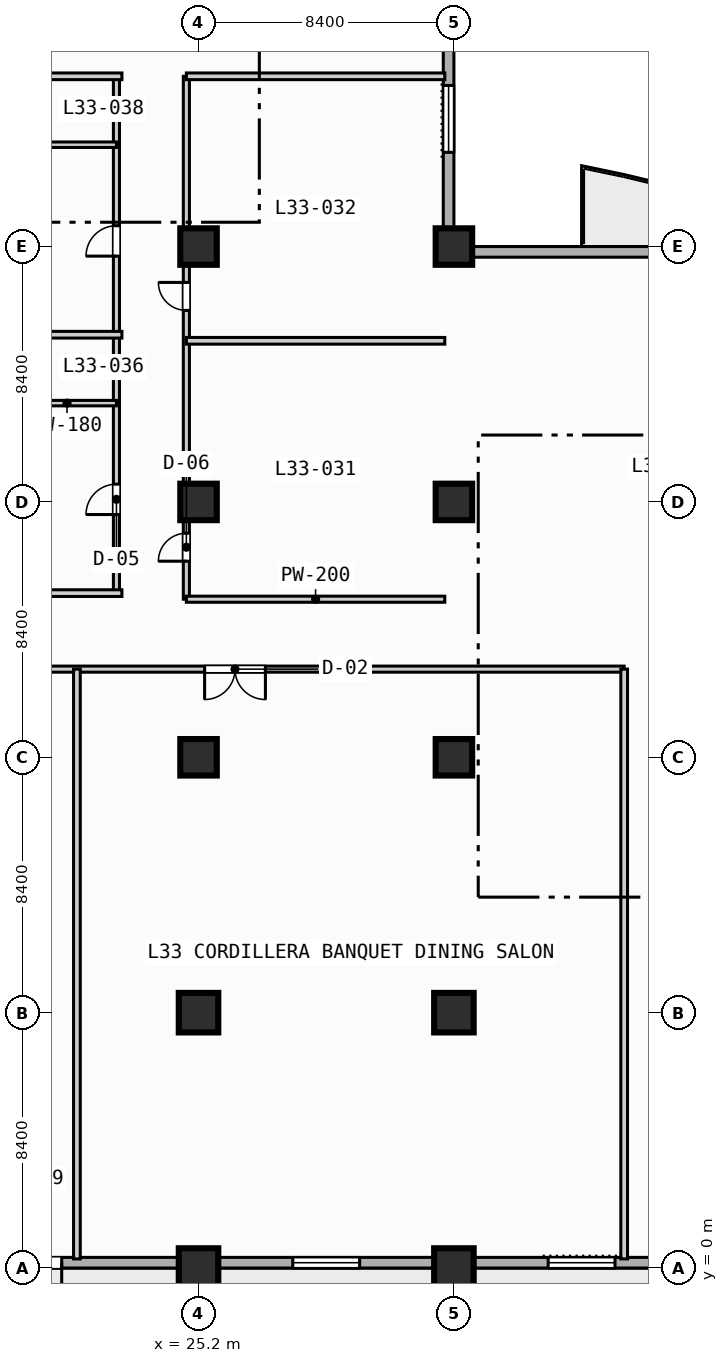
"""IFC4 building model, lengths in metres.
Left out: names, types, materials, properties, quantities, classifications, styles, units other than length and angle.
Written with IfcOpenShell. Run it as: python <this file> out.ifc"""

import sys

from ifc_helpers import new_model, si_unit, direction, frame, frame_2d, origin, origin_2d, place, context, subcontext, project, spatial, rectangle, extrude, element, fill, save


model = new_model("IFC4")
c1 = context("Model", 3, precision=1e-05, world=origin(), true_north=direction((0.0, 1.0)))
c2 = subcontext(c1, "Body", "Model", "MODEL_VIEW")
j1 = project(units=[si_unit("LENGTHUNIT", "METRE"), si_unit("PLANEANGLEUNIT", "RADIAN")], contexts=[c1])
p1 = place(None, origin())
s1 = spatial("IfcSite", under=j1, at=p1, CompositionType="ELEMENT")
p2 = place(p1, origin())
s2 = spatial("IfcBuilding", under=s1, at=p2, CompositionType="ELEMENT")
p3 = place(p2, frame((0.0, 0.0, 138.0)))
s3 = spatial("IfcBuildingStorey", under=s2, at=p3, CompositionType="ELEMENT", Elevation=138.0)
for number, where, z_axis, x_axis in (
    (1, (25.2, 0.0, 0.0), (0.0, 0.0, 1.0), (1.0, 0.0, 0.0)),
    (2, (25.2, 8.4, 0.0), (0.0, 0.0, 1.0), (1.0, 0.0, 0.0)),
):
    element("IfcColumn", number, at=place(p3, frame(where, z_axis=z_axis, x_axis=x_axis)), inside=s3, PredefinedType="COLUMN", context=c2, shape_type="SweptSolid", body=[
        extrude(rectangle(XDim=1.3, YDim=1.3, at=origin_2d()), origin(), (0.0, 0.0, 1.0), 3.8),
    ])
for number, where, z_axis, x_axis in (
    (3, (25.2, 16.8, 0.0), (0.0, 0.0, 1.0), (1.0, 0.0, 0.0)),
    (4, (25.2, 25.2, 0.0), (0.0, 0.0, 1.0), (1.0, 0.0, 0.0)),
    (5, (25.2, 33.6, 0.0), (0.0, 0.0, 1.0), (1.0, 0.0, 0.0)),
):
    element("IfcColumn", number, at=place(p3, frame(where, z_axis=z_axis, x_axis=x_axis)), inside=s3, PredefinedType="COLUMN", context=c2, shape_type="SweptSolid", body=[
        extrude(rectangle(XDim=1.2, YDim=1.2, at=origin_2d()), origin(), (0.0, 0.0, 1.0), 3.8),
    ])
for number, where, z_axis, x_axis in (
    (6, (33.6, 0.0, 0.0), (0.0, 0.0, 1.0), (1.0, 0.0, 0.0)),
    (7, (33.6, 8.4, 0.0), (0.0, 0.0, 1.0), (1.0, 0.0, 0.0)),
):
    element("IfcColumn", number, at=place(p3, frame(where, z_axis=z_axis, x_axis=x_axis)), inside=s3, PredefinedType="COLUMN", context=c2, shape_type="SweptSolid", body=[
        extrude(rectangle(XDim=1.3, YDim=1.3, at=origin_2d()), origin(), (0.0, 0.0, 1.0), 3.8),
    ])
for number, where, z_axis, x_axis in (
    (8, (33.6, 16.8, 0.0), (0.0, 0.0, 1.0), (1.0, 0.0, 0.0)),
    (9, (33.6, 25.2, 0.0), (0.0, 0.0, 1.0), (1.0, 0.0, 0.0)),
    (10, (33.6, 33.6, 0.0), (0.0, 0.0, 1.0), (1.0, 0.0, 0.0)),
):
    element("IfcColumn", number, at=place(p3, frame(where, z_axis=z_axis, x_axis=x_axis)), inside=s3, PredefinedType="COLUMN", context=c2, shape_type="SweptSolid", body=[
        extrude(rectangle(XDim=1.2, YDim=1.2, at=origin_2d()), origin(), (0.0, 0.0, 1.0), 3.8),
    ])
p4 = place(p3, frame((33.425, 89.225, 0.0), z_axis=(0.0, 0.0, 1.0), x_axis=(0.0, -1.0, 0.0)))
e11 = element("IfcWall", 11, at=p4, inside=s3, PredefinedType="STANDARD", context=c2, shape_type="SweptSolid", body=[
    extrude(rectangle(XDim=55.8, YDim=0.35, at=frame_2d((27.9, 0.0))), origin(), (0.0, 0.0, 1.0), 3.55),
])
p5 = place(p4, frame((50.325, 0.0, 0.85)))
e12 = element("IfcOpeningElement", 12, at=p5, cuts=e11, PredefinedType="OPENING", context=c2, shape_type="SweptSolid", body=[
    extrude(rectangle(XDim=2.2, YDim=1.8, at=frame_2d((1.1, 0.9))), frame((0.0, 0.185, 0.0), z_axis=(0.0, -1.0, 0.0), x_axis=(1.0, 0.0, 0.0)), (0.0, 0.0, 1.0), 0.37),
])
p6 = place(p4, frame((33.525, 0.0, 0.85)))
e13 = element("IfcOpeningElement", 13, at=p6, cuts=e11, PredefinedType="OPENING", context=c2, shape_type="SweptSolid", body=[
    extrude(rectangle(XDim=2.2, YDim=1.8, at=frame_2d((1.1, 0.9))), frame((0.0, 0.185, 0.0), z_axis=(0.0, -1.0, 0.0), x_axis=(1.0, 0.0, 0.0)), (0.0, 0.0, 1.0), 0.37),
])
p7 = place(p4, frame((25.125, 0.0, 0.85)))
e14 = element("IfcOpeningElement", 14, at=p7, cuts=e11, PredefinedType="OPENING", context=c2, shape_type="SweptSolid", body=[
    extrude(rectangle(XDim=2.2, YDim=1.8, at=frame_2d((1.1, 0.9))), frame((0.0, 0.185, 0.0), z_axis=(0.0, -1.0, 0.0), x_axis=(1.0, 0.0, 0.0)), (0.0, 0.0, 1.0), 0.37),
])
p8 = place(p4, frame((16.725, 0.0, 0.85)))
e15 = element("IfcOpeningElement", 15, at=p8, cuts=e11, PredefinedType="OPENING", context=c2, shape_type="SweptSolid", body=[
    extrude(rectangle(XDim=2.2, YDim=1.8, at=frame_2d((1.1, 0.9))), frame((0.0, 0.185, 0.0), z_axis=(0.0, -1.0, 0.0), x_axis=(1.0, 0.0, 0.0)), (0.0, 0.0, 1.0), 0.37),
])
p9 = place(p4, frame((8.325, 0.0, 0.85)))
e16 = element("IfcOpeningElement", 16, at=p9, cuts=e11, PredefinedType="OPENING", context=c2, shape_type="SweptSolid", body=[
    extrude(rectangle(XDim=2.2, YDim=1.8, at=frame_2d((1.1, 0.9))), frame((0.0, 0.185, 0.0), z_axis=(0.0, -1.0, 0.0), x_axis=(1.0, 0.0, 0.0)), (0.0, 0.0, 1.0), 0.37),
])
p10 = place(p3, frame((33.425, 33.425, 0.0), z_axis=(0.0, 0.0, 1.0), x_axis=(1.0, 0.0, 0.0)))
e17 = element("IfcWall", 17, at=p10, inside=s3, PredefinedType="STANDARD", context=c2, shape_type="SweptSolid", body=[
    extrude(rectangle(XDim=39.0, YDim=0.35, at=frame_2d((19.5, 0.0))), origin(), (0.0, 0.0, 1.0), 3.55),
])
p11 = place(p10, frame((12.075, 0.0, 0.0)))
e18 = element("IfcOpeningElement", 18, at=p11, cuts=e17, PredefinedType="OPENING", context=c2, shape_type="SweptSolid", body=[
    extrude(rectangle(XDim=1.4, YDim=2.2, at=frame_2d((0.7, 1.1))), frame((0.0, 0.185, 0.0), z_axis=(0.0, -1.0, 0.0), x_axis=(1.0, 0.0, 0.0)), (0.0, 0.0, 1.0), 0.37),
])
p12 = place(p3, frame((72.425, 0.175, 0.0), z_axis=(0.0, 0.0, 1.0), x_axis=(-1.0, 0.0, 0.0)))
e19 = element("IfcWall", 19, at=p12, inside=s3, PredefinedType="STANDARD", context=c2, shape_type="SweptSolid", body=[
    extrude(rectangle(XDim=69.25, YDim=0.35, at=frame_2d((34.625, 0.0))), origin(), (0.0, 0.0, 1.0), 3.55),
])
p13 = place(p12, frame((51.725, 0.0, 0.0)))
e20 = element("IfcOpeningElement", 20, at=p13, cuts=e19, PredefinedType="OPENING", context=c2, shape_type="SweptSolid", body=[
    extrude(rectangle(XDim=1.4, YDim=2.2, at=frame_2d((0.7, 1.1))), frame((0.0, 0.185, 0.0), z_axis=(0.0, -1.0, 0.0), x_axis=(1.0, 0.0, 0.0)), (0.0, 0.0, 1.0), 0.37),
])
p14 = place(p12, frame((58.725, 0.0, 0.85)))
e21 = element("IfcOpeningElement", 21, at=p14, cuts=e19, PredefinedType="OPENING", context=c2, shape_type="SweptSolid", body=[
    extrude(rectangle(XDim=2.2, YDim=1.8, at=frame_2d((1.1, 0.9))), frame((0.0, 0.185, 0.0), z_axis=(0.0, -1.0, 0.0), x_axis=(1.0, 0.0, 0.0)), (0.0, 0.0, 1.0), 0.37),
])
p15 = place(p12, frame((41.925, 0.0, 0.85)))
e22 = element("IfcOpeningElement", 22, at=p15, cuts=e19, PredefinedType="OPENING", context=c2, shape_type="SweptSolid", body=[
    extrude(rectangle(XDim=2.2, YDim=1.8, at=frame_2d((1.1, 0.9))), frame((0.0, 0.185, 0.0), z_axis=(0.0, -1.0, 0.0), x_axis=(1.0, 0.0, 0.0)), (0.0, 0.0, 1.0), 0.37),
])
p16 = place(p12, frame((33.525, 0.0, 0.85)))
e23 = element("IfcOpeningElement", 23, at=p16, cuts=e19, PredefinedType="OPENING", context=c2, shape_type="SweptSolid", body=[
    extrude(rectangle(XDim=2.2, YDim=1.8, at=frame_2d((1.1, 0.9))), frame((0.0, 0.185, 0.0), z_axis=(0.0, -1.0, 0.0), x_axis=(1.0, 0.0, 0.0)), (0.0, 0.0, 1.0), 0.37),
])
p17 = place(p12, frame((25.125, 0.0, 0.85)))
e24 = element("IfcOpeningElement", 24, at=p17, cuts=e19, PredefinedType="OPENING", context=c2, shape_type="SweptSolid", body=[
    extrude(rectangle(XDim=2.2, YDim=1.8, at=frame_2d((1.1, 0.9))), frame((0.0, 0.185, 0.0), z_axis=(0.0, -1.0, 0.0), x_axis=(1.0, 0.0, 0.0)), (0.0, 0.0, 1.0), 0.37),
])
p18 = place(p3, frame((24.8, 22.0, 0.0), z_axis=(0.0, 0.0, 1.0), x_axis=(0.0, 1.0, 0.0)))
e25 = element("IfcWall", 25, at=p18, inside=s3, PredefinedType="PARTITIONING", context=c2, shape_type="SweptSolid", body=[
    extrude(rectangle(XDim=17.2, YDim=0.2, at=frame_2d((8.6, 0.0))), origin(), (0.0, 0.0, 1.0), 3.55),
])
p19 = place(p18, frame((1.25, 0.0, 0.0)))
e26 = element("IfcOpeningElement", 26, at=p19, cuts=e25, PredefinedType="OPENING", context=c2, shape_type="SweptSolid", body=[
    extrude(rectangle(XDim=0.92, YDim=2.1, at=frame_2d((0.46, 1.05))), frame((0.0, 0.11, 0.0), z_axis=(0.0, -1.0, 0.0), x_axis=(1.0, 0.0, 0.0)), (0.0, 0.0, 1.0), 0.22),
])
p20 = place(p18, frame((9.5, 0.0, 0.0)))
e27 = element("IfcOpeningElement", 27, at=p20, cuts=e25, PredefinedType="OPENING", context=c2, shape_type="SweptSolid", body=[
    extrude(rectangle(XDim=0.92, YDim=2.1, at=frame_2d((0.46, 1.05))), frame((0.0, 0.11, 0.0), z_axis=(0.0, -1.0, 0.0), x_axis=(1.0, 0.0, 0.0)), (0.0, 0.0, 1.0), 0.22),
])
p21 = place(p3, frame((24.8, 22.0, 0.0), z_axis=(0.0, 0.0, 1.0), x_axis=(1.0, 0.0, 0.0)))
e28 = element("IfcWall", 28, at=p21, inside=s3, PredefinedType="PARTITIONING", context=c2, shape_type="SweptSolid", body=[
    extrude(rectangle(XDim=8.5, YDim=0.2, at=frame_2d((4.25, 0.0))), origin(), (0.0, 0.0, 1.0), 3.55),
])
for number, where, z_axis, x_axis in (
    (29, (24.8, 30.5, 0.0), (0.0, 0.0, 1.0), (1.0, 0.0, 0.0)),
    (30, (24.8, 39.2, 0.0), (0.0, 0.0, 1.0), (1.0, 0.0, 0.0)),
):
    element("IfcWall", number, at=place(p3, frame(where, z_axis=z_axis, x_axis=x_axis)), inside=s3, PredefinedType="PARTITIONING", context=c2, shape_type="SweptSolid", body=[
        extrude(rectangle(XDim=8.5, YDim=0.22, at=frame_2d((4.25, 0.0))), origin(), (0.0, 0.0, 1.0), 3.55),
    ])
p22 = place(p3, frame((3.4, 19.7, 0.0), z_axis=(0.0, 0.0, 1.0), x_axis=(1.0, 0.0, 0.0)))
e31 = element("IfcWall", 31, at=p22, inside=s3, PredefinedType="PARTITIONING", context=c2, shape_type="SweptSolid", body=[
    extrude(rectangle(XDim=35.8, YDim=0.2, at=frame_2d((17.9, 0.0))), origin(), (0.0, 0.0, 1.0), 3.55),
])
p23 = place(p22, frame((5.0, 0.0, 0.0)))
e32 = element("IfcOpeningElement", 32, at=p23, cuts=e31, PredefinedType="OPENING", context=c2, shape_type="SweptSolid", body=[
    extrude(rectangle(XDim=2.0, YDim=2.15, at=frame_2d((1.0, 1.075))), frame((0.0, 0.11, 0.0), z_axis=(0.0, -1.0, 0.0), x_axis=(1.0, 0.0, 0.0)), (0.0, 0.0, 1.0), 0.22),
])
p24 = place(p22, frame((22.0, 0.0, 0.0)))
e33 = element("IfcOpeningElement", 33, at=p24, cuts=e31, PredefinedType="OPENING", context=c2, shape_type="SweptSolid", body=[
    extrude(rectangle(XDim=2.0, YDim=2.15, at=frame_2d((1.0, 1.075))), frame((0.0, 0.11, 0.0), z_axis=(0.0, -1.0, 0.0), x_axis=(1.0, 0.0, 0.0)), (0.0, 0.0, 1.0), 0.22),
])
for number, where, z_axis, x_axis in (
    (34, (21.2, 0.3, 0.0), (0.0, 0.0, 1.0), (0.0, 1.0, 0.0)),
    (35, (39.2, 0.3, 0.0), (0.0, 0.0, 1.0), (0.0, 1.0, 0.0)),
):
    element("IfcWall", number, at=place(p3, frame(where, z_axis=z_axis, x_axis=x_axis)), inside=s3, PredefinedType="PARTITIONING", context=c2, shape_type="SweptSolid", body=[
        extrude(rectangle(XDim=19.4, YDim=0.22, at=frame_2d((9.7, 0.0))), origin(), (0.0, 0.0, 1.0), 3.55),
    ])
p25 = place(p3, frame((22.5, 22.2, 0.0), z_axis=(0.0, 0.0, 1.0), x_axis=(0.0, 1.0, 0.0)))
e36 = element("IfcWall", 36, at=p25, inside=s3, PredefinedType="PARTITIONING", context=c2, shape_type="SweptSolid", body=[
    extrude(rectangle(XDim=17.0, YDim=0.2, at=frame_2d((8.5, 0.0))), origin(), (0.0, 0.0, 1.0), 3.55),
])
p26 = place(p25, frame((2.585, 0.0, 0.0)))
e37 = element("IfcOpeningElement", 37, at=p26, cuts=e36, PredefinedType="OPENING", context=c2, shape_type="SweptSolid", body=[
    extrude(rectangle(XDim=1.0, YDim=2.15, at=frame_2d((0.5, 1.075))), frame((0.0, 0.11, 0.0), z_axis=(0.0, -1.0, 0.0), x_axis=(1.0, 0.0, 0.0)), (0.0, 0.0, 1.0), 0.22),
])
p27 = place(p25, frame((11.085, 0.0, 0.0)))
e38 = element("IfcOpeningElement", 38, at=p27, cuts=e36, PredefinedType="OPENING", context=c2, shape_type="SweptSolid", body=[
    extrude(rectangle(XDim=1.0, YDim=2.15, at=frame_2d((0.5, 1.075))), frame((0.0, 0.11, 0.0), z_axis=(0.0, -1.0, 0.0), x_axis=(1.0, 0.0, 0.0)), (0.0, 0.0, 1.0), 0.22),
])
p28 = place(p3, frame((0.2, 22.2, 0.0), z_axis=(0.0, 0.0, 1.0), x_axis=(1.0, 0.0, 0.0)))
e39 = element("IfcWall", 39, at=p28, inside=s3, PredefinedType="PARTITIONING", context=c2, shape_type="SweptSolid", body=[
    extrude(rectangle(XDim=22.48, YDim=0.22, at=frame_2d((11.24, 0.0))), origin(), (0.0, 0.0, 1.0), 3.55),
])
p29 = place(p3, frame((19.25, 28.45, 0.0), z_axis=(0.0, 0.0, 1.0), x_axis=(1.0, 0.0, 0.0)))
e40 = element("IfcWall", 40, at=p29, inside=s3, PredefinedType="PLUMBINGWALL", context=c2, shape_type="SweptSolid", body=[
    extrude(rectangle(XDim=3.25, YDim=0.18, at=frame_2d((1.625, 0.0))), origin(), (0.0, 0.0, 1.0), 3.55),
])
for number, where, z_axis, x_axis in (
    (41, (0.2, 30.7, 0.0), (0.0, 0.0, 1.0), (1.0, 0.0, 0.0)),
    (42, (0.2, 39.2, 0.0), (0.0, 0.0, 1.0), (1.0, 0.0, 0.0)),
):
    element("IfcWall", number, at=place(p3, frame(where, z_axis=z_axis, x_axis=x_axis)), inside=s3, PredefinedType="PARTITIONING", context=c2, shape_type="SweptSolid", body=[
        extrude(rectangle(XDim=22.48, YDim=0.22, at=frame_2d((11.24, 0.0))), origin(), (0.0, 0.0, 1.0), 3.55),
    ])
p30 = place(p3, frame((19.25, 36.95, 0.0), z_axis=(0.0, 0.0, 1.0), x_axis=(1.0, 0.0, 0.0)))
e43 = element("IfcWall", 43, at=p30, inside=s3, PredefinedType="PLUMBINGWALL", context=c2, shape_type="SweptSolid", body=[
    extrude(rectangle(XDim=3.25, YDim=0.18, at=frame_2d((1.625, 0.0))), origin(), (0.0, 0.0, 1.0), 3.55),
])
p31 = place(p5, origin())
e44 = element("IfcWindow", 44, at=p31, inside=s3, PartitioningType="SINGLE_PANEL", PredefinedType="WINDOW", context=c2, shape_type="SweptSolid", body=[
    extrude(rectangle(XDim=2.2, YDim=1.8, at=frame_2d((1.1, 0.9))), frame((0.0, 0.03, 0.0), z_axis=(0.0, -1.0, 0.0), x_axis=(1.0, 0.0, 0.0)), (0.0, 0.0, 1.0), 0.06),
])
fill(e12, e44)
p32 = place(p13, origin())
e45 = element("IfcDoor", 45, at=p32, inside=s3, OperationType="SINGLE_SWING_LEFT", PredefinedType="DOOR", context=c2, shape_type="SweptSolid", body=[
    extrude(rectangle(XDim=1.4, YDim=2.2, at=frame_2d((0.7, 1.1))), frame((0.0, 0.025, 0.0), z_axis=(0.0, -1.0, 0.0), x_axis=(1.0, 0.0, 0.0)), (0.0, 0.0, 1.0), 0.05),
])
fill(e20, e45)
p33 = place(p15, origin())
e46 = element("IfcWindow", 46, at=p33, inside=s3, PartitioningType="SINGLE_PANEL", PredefinedType="WINDOW", context=c2, shape_type="SweptSolid", body=[
    extrude(rectangle(XDim=2.2, YDim=1.8, at=frame_2d((1.1, 0.9))), frame((0.0, 0.03, 0.0), z_axis=(0.0, -1.0, 0.0), x_axis=(1.0, 0.0, 0.0)), (0.0, 0.0, 1.0), 0.06),
])
fill(e22, e46)
p34 = place(p16, origin())
e47 = element("IfcWindow", 47, at=p34, inside=s3, PartitioningType="SINGLE_PANEL", PredefinedType="WINDOW", context=c2, shape_type="SweptSolid", body=[
    extrude(rectangle(XDim=2.2, YDim=1.8, at=frame_2d((1.1, 0.9))), frame((0.0, 0.03, 0.0), z_axis=(0.0, -1.0, 0.0), x_axis=(1.0, 0.0, 0.0)), (0.0, 0.0, 1.0), 0.06),
])
fill(e23, e47)
p35 = place(p19, origin())
e48 = element("IfcDoor", 48, at=p35, inside=s3, OperationType="SINGLE_SWING_LEFT", PredefinedType="DOOR", context=c2, shape_type="SweptSolid", body=[
    extrude(rectangle(XDim=0.92, YDim=2.1, at=frame_2d((0.46, 1.05))), frame((0.0, 0.025, 0.0), z_axis=(0.0, -1.0, 0.0), x_axis=(1.0, 0.0, 0.0)), (0.0, 0.0, 1.0), 0.05),
])
fill(e26, e48)
p36 = place(p20, origin())
e49 = element("IfcDoor", 49, at=p36, inside=s3, OperationType="SINGLE_SWING_RIGHT", PredefinedType="DOOR", context=c2, shape_type="SweptSolid", body=[
    extrude(rectangle(XDim=0.92, YDim=2.1, at=frame_2d((0.46, 1.05))), frame((0.0, 0.025, 0.0), z_axis=(0.0, -1.0, 0.0), x_axis=(1.0, 0.0, 0.0)), (0.0, 0.0, 1.0), 0.05),
])
fill(e27, e49)
p37 = place(p24, origin())
e50 = element("IfcDoor", 50, at=p37, inside=s3, OperationType="SINGLE_SWING_RIGHT", PredefinedType="DOOR", context=c2, shape_type="SweptSolid", body=[
    extrude(rectangle(XDim=2.0, YDim=2.15, at=frame_2d((1.0, 1.075))), frame((0.0, 0.025, 0.0), z_axis=(0.0, -1.0, 0.0), x_axis=(1.0, 0.0, 0.0)), (0.0, 0.0, 1.0), 0.05),
])
fill(e33, e50)
p38 = place(p26, origin())
e51 = element("IfcDoor", 51, at=p38, inside=s3, OperationType="SINGLE_SWING_LEFT", PredefinedType="DOOR", context=c2, shape_type="SweptSolid", body=[
    extrude(rectangle(XDim=1.0, YDim=2.15, at=frame_2d((0.5, 1.075))), frame((0.0, 0.025, 0.0), z_axis=(0.0, -1.0, 0.0), x_axis=(1.0, 0.0, 0.0)), (0.0, 0.0, 1.0), 0.05),
])
fill(e37, e51)
p39 = place(p27, origin())
e52 = element("IfcDoor", 52, at=p39, inside=s3, OperationType="SINGLE_SWING_LEFT", PredefinedType="DOOR", context=c2, shape_type="SweptSolid", body=[
    extrude(rectangle(XDim=1.0, YDim=2.15, at=frame_2d((0.5, 1.075))), frame((0.0, 0.025, 0.0), z_axis=(0.0, -1.0, 0.0), x_axis=(1.0, 0.0, 0.0)), (0.0, 0.0, 1.0), 0.05),
])
fill(e38, e52)
save(model, sys.argv[1])
